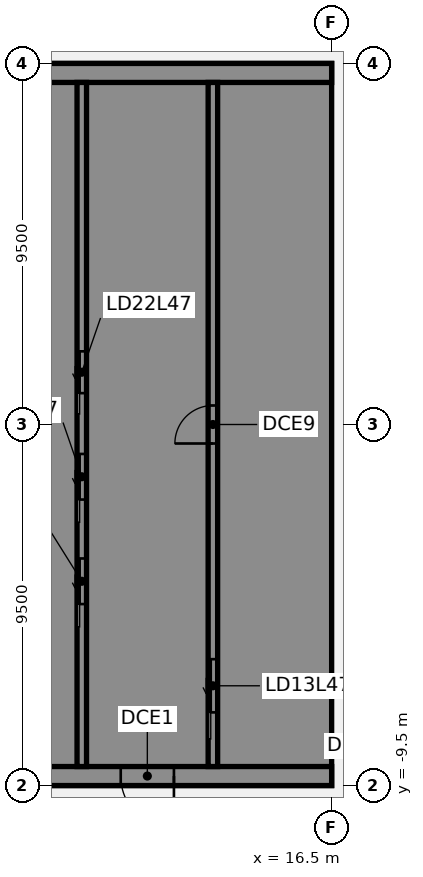
"""IFC4 building model, lengths in metres.
Left out: names, types, materials, properties, quantities, classifications, styles, units other than length and angle.
Written with IfcOpenShell. Run it as: python <this file> out.ifc"""

import sys

from ifc_helpers import new_model, si_unit, direction, frame, frame_2d, origin, place, context, subcontext, project, spatial, polyline, rectangle, outline, extrude, element, fill, save


model = new_model("IFC4")
c1 = context("Model", 3, precision=1e-05, world=origin(), true_north=direction((0.0, 1.0)))
c2 = subcontext(c1, "Body", "Model", "MODEL_VIEW")
j1 = project(units=[si_unit("LENGTHUNIT", "METRE"), si_unit("PLANEANGLEUNIT", "RADIAN")], contexts=[c1])
p1 = place(None, origin())
s1 = spatial("IfcSite", under=j1, at=p1, CompositionType="ELEMENT")
p2 = place(p1, origin())
s2 = spatial("IfcBuilding", under=s1, at=p2, CompositionType="ELEMENT")
p3 = place(p2, frame((0.0, 0.0, 189.7)))
s3 = spatial("IfcBuildingStorey", under=s2, at=p3, CompositionType="ELEMENT", Elevation=189.7)
p4 = place(p3, frame((16.5, -9.25, 0.0), z_axis=(0.0, 0.0, 1.0), x_axis=(-1.0, 0.0, 0.0)))
e1 = element("IfcWall", 1, at=p4, inside=s3, PredefinedType="SHEAR", context=c2, shape_type="SweptSolid", body=[
    extrude(rectangle(XDim=13.0, YDim=0.5, at=frame_2d((6.5, 0.0))), origin(), (0.0, 0.0, 1.0), 3.46),
])
p5 = place(p4, frame((4.15, 0.0, 0.0)))
e2 = element("IfcOpeningElement", 2, at=p5, cuts=e1, PredefinedType="OPENING", context=c2, shape_type="SweptSolid", body=[
    extrude(rectangle(XDim=1.4, YDim=2.1, at=frame_2d((0.7, 1.05))), frame((0.0, 0.26, 0.0), z_axis=(0.0, -1.0, 0.0), x_axis=(1.0, 0.0, 0.0)), (0.0, 0.0, 1.0), 0.52),
])
p6 = place(p4, frame((10.125, 0.0, 0.0)))
e3 = element("IfcOpeningElement", 3, at=p6, cuts=e1, PredefinedType="OPENING", context=c2, shape_type="SweptSolid", body=[
    extrude(rectangle(XDim=1.4, YDim=2.1, at=frame_2d((0.7, 1.05))), frame((0.0, 0.26, 0.0), z_axis=(0.0, -1.0, 0.0), x_axis=(1.0, 0.0, 0.0)), (0.0, 0.0, 1.0), 0.52),
])
p7 = place(p3, origin())
e4 = element("IfcWall", 4, at=p7, inside=s3, PredefinedType="SHEAR", context=c2, shape_type="SweptSolid", body=[
    extrude(outline(polyline([(13.5, -8.125), (13.5, -9.0), (16.0, -9.0), (16.5, -9.0), (16.5, 9.0), (16.0, 9.0), (13.5, 9.0), (13.5, 8.125), (16.0, 8.125), (16.0, 5.625), (13.5, 5.625), (13.5, 5.375), (16.0, 5.375), (16.0, -5.375), (13.5, -5.375), (13.5, -5.625), (16.0, -5.625), (16.0, -8.125), (13.5, -8.125)])), origin(), (0.0, 0.0, 1.0), 3.46),
])
p8 = place(p3, frame((16.5, 9.25, 0.0), z_axis=(0.0, 0.0, 1.0), x_axis=(-1.0, 0.0, 0.0)))
e5 = element("IfcWall", 5, at=p8, inside=s3, PredefinedType="SHEAR", context=c2, shape_type="SweptSolid", body=[
    extrude(rectangle(XDim=13.0, YDim=0.5, at=frame_2d((6.5, 0.0))), origin(), (0.0, 0.0, 1.0), 3.46),
])
p9 = place(p3, origin())
e6 = element("IfcWall", 6, at=p9, inside=s3, PredefinedType="SHEAR", context=c2, shape_type="SweptSolid", body=[
    extrude(outline(polyline([(9.8, -5.375), (7.5, -5.375), (7.5, -2.875), (9.8, -2.875), (9.8, -2.625), (7.5, -2.625), (7.5, -0.125), (9.8, -0.125), (9.8, 0.125), (7.5, 0.125), (7.5, 2.625), (9.8, 2.625), (9.8, 2.875), (7.5, 2.875), (7.5, 5.375), (9.8, 5.375), (9.8, 5.625), (7.5, 5.625), (7.5, 8.125), (9.8, 8.125), (9.8, 9.0), (7.5, 9.0), (7.25, 9.0), (7.25, -5.625), (7.5, -5.625), (9.8, -5.625), (9.8, -5.375)])), origin(), (0.0, 0.0, 1.0), 3.46),
])
p10 = place(p3, origin())
e7 = element("IfcWall", 7, at=p10, inside=s3, PredefinedType="SHEAR", context=c2, shape_type="SweptSolid", body=[
    extrude(outline(polyline([(7.5, -8.125), (7.5, -9.0), (9.8, -9.0), (9.8, -8.125), (9.8, -5.625), (9.55, -5.625), (9.55, -8.125), (7.5, -8.125)])), origin(), (0.0, 0.0, 1.0), 3.46),
])
p11 = place(p3, frame((13.375, -9.0, 0.0), z_axis=(0.0, 0.0, 1.0), x_axis=(0.0, 1.0, 0.0)))
e8 = element("IfcWall", 8, at=p11, inside=s3, PredefinedType="SHEAR", context=c2, shape_type="SweptSolid", body=[
    extrude(rectangle(XDim=18.0, YDim=0.25, at=frame_2d((9.0, 0.0))), origin(), (0.0, 0.0, 1.0), 3.46),
])
p12 = place(p11, frame((1.425, 0.0, 0.0)))
e9 = element("IfcOpeningElement", 9, at=p12, cuts=e8, PredefinedType="OPENING", context=c2, shape_type="SweptSolid", body=[
    extrude(rectangle(XDim=1.4, YDim=2.1, at=frame_2d((0.7, 1.05))), frame((0.0, 0.135, 0.0), z_axis=(0.0, -1.0, 0.0), x_axis=(1.0, 0.0, 0.0)), (0.0, 0.0, 1.0), 0.27),
])
p13 = place(p11, frame((8.5, 0.0, 0.0)))
e10 = element("IfcOpeningElement", 10, at=p13, cuts=e8, PredefinedType="OPENING", context=c2, shape_type="SweptSolid", body=[
    extrude(rectangle(XDim=1.0, YDim=2.1, at=frame_2d((0.5, 1.05))), frame((0.0, 0.135, 0.0), z_axis=(0.0, -1.0, 0.0), x_axis=(1.0, 0.0, 0.0)), (0.0, 0.0, 1.0), 0.27),
])
p14 = place(p3, frame((9.925, -9.0, 0.0), z_axis=(0.0, 0.0, 1.0), x_axis=(0.0, 1.0, 0.0)))
e11 = element("IfcWall", 11, at=p14, inside=s3, PredefinedType="SHEAR", context=c2, shape_type="SweptSolid", body=[
    extrude(rectangle(XDim=18.0, YDim=0.25, at=frame_2d((9.0, 0.0))), origin(), (0.0, 0.0, 1.0), 3.46),
])
p15 = place(p14, frame((4.275, 0.0, 0.0)))
e12 = element("IfcOpeningElement", 12, at=p15, cuts=e11, PredefinedType="OPENING", context=c2, shape_type="SweptSolid", body=[
    extrude(rectangle(XDim=1.2, YDim=2.1, at=frame_2d((0.6, 1.05))), frame((0.0, 0.135, 0.0), z_axis=(0.0, -1.0, 0.0), x_axis=(1.0, 0.0, 0.0)), (0.0, 0.0, 1.0), 0.27),
])
p16 = place(p14, frame((7.025, 0.0, 0.0)))
e13 = element("IfcOpeningElement", 13, at=p16, cuts=e11, PredefinedType="OPENING", context=c2, shape_type="SweptSolid", body=[
    extrude(rectangle(XDim=1.2, YDim=2.1, at=frame_2d((0.6, 1.05))), frame((0.0, 0.135, 0.0), z_axis=(0.0, -1.0, 0.0), x_axis=(1.0, 0.0, 0.0)), (0.0, 0.0, 1.0), 0.27),
])
p17 = place(p14, frame((9.825, 0.0, 0.0)))
e14 = element("IfcOpeningElement", 14, at=p17, cuts=e11, PredefinedType="OPENING", context=c2, shape_type="SweptSolid", body=[
    extrude(rectangle(XDim=1.1, YDim=2.1, at=frame_2d((0.55, 1.05))), frame((0.0, 0.135, 0.0), z_axis=(0.0, -1.0, 0.0), x_axis=(1.0, 0.0, 0.0)), (0.0, 0.0, 1.0), 0.27),
])
p18 = place(p5, origin())
e15 = element("IfcDoor", 15, at=p18, inside=s3, OperationType="SINGLE_SWING_LEFT", PredefinedType="DOOR", context=c2, shape_type="SweptSolid", body=[
    extrude(rectangle(XDim=1.4, YDim=2.1, at=frame_2d((0.7, 1.05))), frame((0.0, 0.025, 0.0), z_axis=(0.0, -1.0, 0.0), x_axis=(1.0, 0.0, 0.0)), (0.0, 0.0, 1.0), 0.05),
])
fill(e2, e15)
p19 = place(p12, origin())
e16 = element("IfcDoor", 16, at=p19, inside=s3, OperationType="SLIDING_TO_LEFT", PredefinedType="DOOR", context=c2, shape_type="SweptSolid", body=[
    extrude(rectangle(XDim=1.4, YDim=2.1, at=frame_2d((0.7, 1.05))), frame((0.0, 0.025, 0.0), z_axis=(0.0, -1.0, 0.0), x_axis=(1.0, 0.0, 0.0)), (0.0, 0.0, 1.0), 0.05),
])
fill(e9, e16)
p20 = place(p15, origin())
e17 = element("IfcDoor", 17, at=p20, inside=s3, OperationType="SLIDING_TO_LEFT", PredefinedType="DOOR", context=c2, shape_type="SweptSolid", body=[
    extrude(rectangle(XDim=1.2, YDim=2.1, at=frame_2d((0.6, 1.05))), frame((0.0, 0.025, 0.0), z_axis=(0.0, -1.0, 0.0), x_axis=(1.0, 0.0, 0.0)), (0.0, 0.0, 1.0), 0.05),
])
fill(e12, e17)
p21 = place(p16, origin())
e18 = element("IfcDoor", 18, at=p21, inside=s3, OperationType="SLIDING_TO_LEFT", PredefinedType="DOOR", context=c2, shape_type="SweptSolid", body=[
    extrude(rectangle(XDim=1.2, YDim=2.1, at=frame_2d((0.6, 1.05))), frame((0.0, 0.025, 0.0), z_axis=(0.0, -1.0, 0.0), x_axis=(1.0, 0.0, 0.0)), (0.0, 0.0, 1.0), 0.05),
])
fill(e13, e18)
p22 = place(p17, origin())
e19 = element("IfcDoor", 19, at=p22, inside=s3, OperationType="SLIDING_TO_LEFT", PredefinedType="DOOR", context=c2, shape_type="SweptSolid", body=[
    extrude(rectangle(XDim=1.1, YDim=2.1, at=frame_2d((0.55, 1.05))), frame((0.0, 0.025, 0.0), z_axis=(0.0, -1.0, 0.0), x_axis=(1.0, 0.0, 0.0)), (0.0, 0.0, 1.0), 0.05),
])
fill(e14, e19)
p23 = place(p13, origin())
e20 = element("IfcDoor", 20, at=p23, inside=s3, OperationType="SINGLE_SWING_LEFT", PredefinedType="DOOR", context=c2, shape_type="SweptSolid", body=[
    extrude(rectangle(XDim=1.0, YDim=2.1, at=frame_2d((0.5, 1.05))), frame((0.0, 0.025, 0.0), z_axis=(0.0, -1.0, 0.0), x_axis=(1.0, 0.0, 0.0)), (0.0, 0.0, 1.0), 0.05),
])
fill(e10, e20)
save(model, sys.argv[1])
